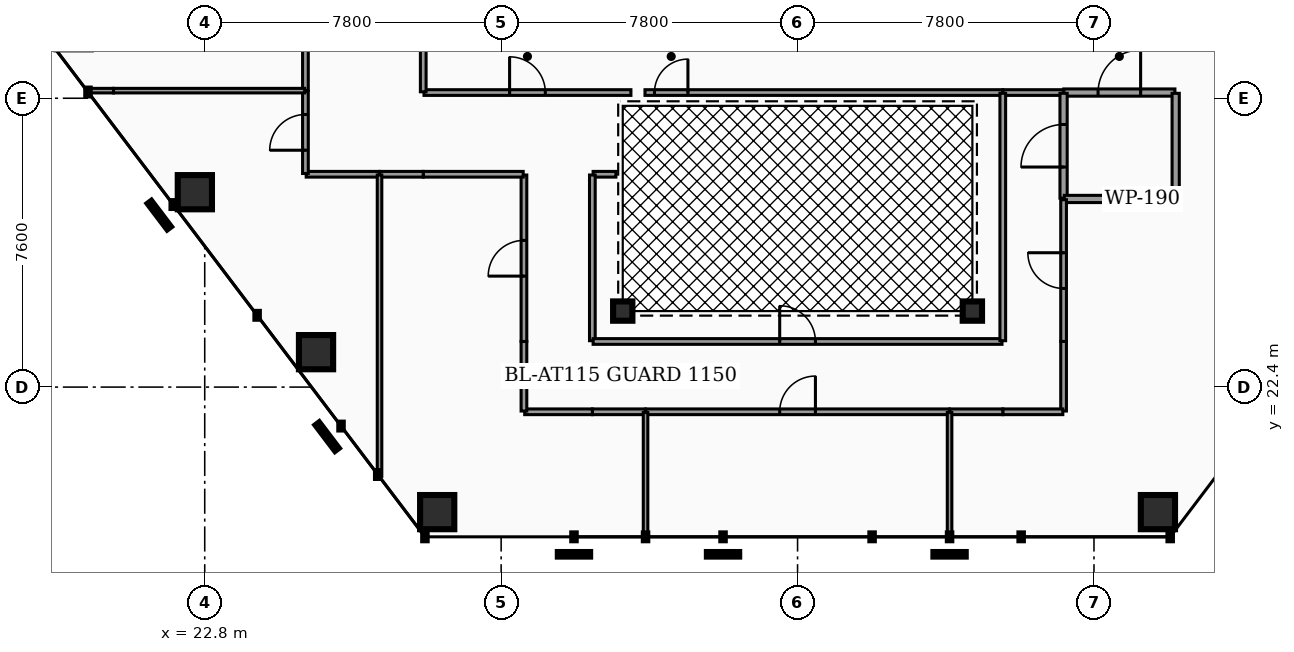
"""IFC4 building model, lengths in metres.
Left out: names, types, materials, properties, quantities, classifications, styles, units other than length and angle.
Written with IfcOpenShell. Run it as: python <this file> out.ifc"""

import sys

from ifc_helpers import new_model, si_unit, direction, frame, frame_2d, origin, origin_2d, place, context, subcontext, project, spatial, rectangle, hollow_rectangle, hollow_circle, extrude, element, fill, save


model = new_model("IFC4")
c1 = context("Model", 3, precision=1e-05, world=origin(), true_north=direction((0.0, 1.0)))
c2 = subcontext(c1, "Body", "Model", "MODEL_VIEW")
j1 = project(units=[si_unit("LENGTHUNIT", "METRE"), si_unit("PLANEANGLEUNIT", "RADIAN")], contexts=[c1])
p1 = place(None, origin())
s1 = spatial("IfcSite", under=j1, at=p1, CompositionType="ELEMENT")
p2 = place(p1, origin())
s2 = spatial("IfcBuilding", under=s1, at=p2, CompositionType="ELEMENT")
p3 = place(p2, frame((0.0, 0.0, 92.82)))
s3 = spatial("IfcBuildingStorey", under=s2, at=p3, CompositionType="ELEMENT", Elevation=92.82)
p4 = place(p3, frame((22.54, 27.528, 0.0), z_axis=(0.028788707178, 0.041299985686, 0.998731956794), x_axis=(-0.820362117185, 0.571844381531, 0.0)))
e1 = element("IfcColumn", 1, at=p4, inside=s3, PredefinedType="COLUMN", context=c2, shape_type="SweptSolid", body=[
    extrude(hollow_rectangle(XDim=0.9, YDim=0.9, WallThickness=0.045, at=origin_2d()), origin(), (0.0, 0.0, 1.0), 3.825),
])
p5 = place(p3, frame((25.729, 23.319, 0.0), z_axis=(0.057681862964, 0.003126561156, 0.9983301194), x_axis=(-0.054124089208, 0.998534217224, 0.0)))
e2 = element("IfcColumn", 2, at=p5, inside=s3, PredefinedType="COLUMN", context=c2, shape_type="SweptSolid", body=[
    extrude(hollow_rectangle(XDim=0.9, YDim=0.9, WallThickness=0.045, at=origin_2d()), origin(), (0.0, 0.0, 1.0), 3.826),
])
p6 = place(p3, frame((28.917, 19.11, 0.0), z_axis=(0.086417078511, -0.035063188704, 0.995641833864), x_axis=(0.375974351088, 0.926630070376, 0.0)))
e3 = element("IfcColumn", 3, at=p6, inside=s3, PredefinedType="COLUMN", context=c2, shape_type="SweptSolid", body=[
    extrude(hollow_rectangle(XDim=0.9, YDim=0.9, WallThickness=0.045, at=origin_2d()), origin(), (0.0, 0.0, 1.0), 3.836),
])
p7 = place(p3, frame((47.883, 19.11, 0.0), z_axis=(-0.086480238317, -0.035062995815, 0.995636356661), x_axis=(0.375736765938, -0.926726433594, 0.0)))
e4 = element("IfcColumn", 4, at=p7, inside=s3, PredefinedType="COLUMN", context=c2, shape_type="SweptSolid", body=[
    extrude(hollow_rectangle(XDim=0.9, YDim=0.9, WallThickness=0.045, at=origin_2d()), origin(), (0.0, 0.0, 1.0), 3.837),
])
for number, where, z_axis, x_axis in (
    (5, (33.8, 24.4, 0.0), (0.0, 0.0, 1.0), (1.0, 0.0, 0.0)),
    (6, (43.0, 24.4, 0.0), (0.0, 0.0, 1.0), (1.0, 0.0, 0.0)),
):
    element("IfcColumn", number, at=place(p3, frame(where, z_axis=z_axis, x_axis=x_axis)), inside=s3, PredefinedType="COLUMN", context=c2, shape_type="SweptSolid", body=[
        extrude(hollow_circle(Radius=0.254, WallThickness=0.02, at=origin_2d()), origin(), (0.0, 0.0, 1.0), 3.82),
    ])
p8 = place(p3, frame((45.405, 30.15, 0.0), z_axis=(0.0, 0.0, 1.0), x_axis=(1.0, 0.0, 0.0)))
e7 = element("IfcWall", 7, at=p8, inside=s3, PredefinedType="PARTITIONING", context=c2, shape_type="SweptSolid", body=[
    extrude(rectangle(XDim=2.925, YDim=0.19, at=frame_2d((1.462, 0.0))), origin(), (0.0, 0.0, 1.0), 2.777),
])
p9 = place(p8, frame((0.903, 0.0, 0.0)))
e8 = element("IfcOpeningElement", 8, at=p9, cuts=e7, PredefinedType="OPENING", context=c2, shape_type="SweptSolid", body=[
    extrude(rectangle(XDim=1.12, YDim=2.05, at=frame_2d((0.56, 1.025))), frame((0.0, 0.105, 0.0), z_axis=(0.0, -1.0, 0.0), x_axis=(1.0, 0.0, 0.0)), (0.0, 0.0, 1.0), 0.21),
])
p10 = place(p3, frame((43.805, 30.15, 0.0), z_axis=(0.0, 0.0, 1.0), x_axis=(1.0, 0.0, 0.0)))
e9 = element("IfcWall", 9, at=p10, inside=s3, PredefinedType="PARTITIONING", context=c2, shape_type="SweptSolid", body=[
    extrude(rectangle(XDim=1.59, YDim=0.15, at=frame_2d((0.795, 0.0))), origin(), (0.0, 0.0, 1.0), 2.777),
])
p11 = place(p3, frame((28.57, 30.15, 0.0), z_axis=(0.0, 0.0, 1.0), x_axis=(1.0, 0.0, 0.0)))
e10 = element("IfcWall", 10, at=p11, inside=s3, PredefinedType="PARTITIONING", context=c2, shape_type="SweptSolid", body=[
    extrude(rectangle(XDim=5.445, YDim=0.15, at=frame_2d((2.722, 0.0))), origin(), (0.0, 0.0, 1.0), 2.777),
])
p12 = place(p11, frame((2.252, 0.0, 0.0)))
e11 = element("IfcOpeningElement", 11, at=p12, cuts=e10, PredefinedType="OPENING", context=c2, shape_type="SweptSolid", body=[
    extrude(rectangle(XDim=0.94, YDim=2.05, at=frame_2d((0.47, 1.025))), frame((0.0, 0.085, 0.0), z_axis=(0.0, -1.0, 0.0), x_axis=(1.0, 0.0, 0.0)), (0.0, 0.0, 1.0), 0.17),
])
p13 = place(p3, frame((28.55, 30.17, 0.0), z_axis=(0.0, 0.0, 1.0), x_axis=(0.0, 1.0, 0.0)))
e12 = element("IfcWall", 12, at=p13, inside=s3, PredefinedType="PARTITIONING", context=c2, shape_type="SweptSolid", body=[
    extrude(rectangle(XDim=3.065, YDim=0.15, at=frame_2d((1.533, 0.0))), origin(), (0.0, 0.0, 1.0), 2.777),
])
p14 = place(p3, frame((34.385, 30.15, 0.0), z_axis=(0.0, 0.0, 1.0), x_axis=(1.0, 0.0, 0.0)))
e13 = element("IfcWall", 13, at=p14, inside=s3, PredefinedType="PARTITIONING", context=c2, shape_type="SweptSolid", body=[
    extrude(rectangle(XDim=9.41, YDim=0.15, at=frame_2d((4.705, 0.0))), origin(), (0.0, 0.0, 1.0), 2.777),
])
p15 = place(p14, frame((0.25, 0.0, 0.0)))
e14 = element("IfcOpeningElement", 14, at=p15, cuts=e13, PredefinedType="OPENING", context=c2, shape_type="SweptSolid", body=[
    extrude(rectangle(XDim=0.88, YDim=2.05, at=frame_2d((0.44, 1.025))), frame((0.0, 0.085, 0.0), z_axis=(0.0, -1.0, 0.0), x_axis=(1.0, 0.0, 0.0)), (0.0, 0.0, 1.0), 0.17),
])
p16 = place(p3, frame((45.4, 27.37, 0.0), z_axis=(0.0, 0.0, 1.0), x_axis=(0.0, 1.0, 0.0)))
e15 = element("IfcWall", 15, at=p16, inside=s3, PredefinedType="PARTITIONING", context=c2, shape_type="SweptSolid", body=[
    extrude(rectangle(XDim=2.76, YDim=0.19, at=frame_2d((1.38, 0.0))), origin(), (0.0, 0.0, 1.0), 2.777),
])
p17 = place(p16, frame((0.82, 0.0, 0.0)))
e16 = element("IfcOpeningElement", 16, at=p17, cuts=e15, PredefinedType="OPENING", context=c2, shape_type="SweptSolid", body=[
    extrude(rectangle(XDim=1.12, YDim=2.05, at=frame_2d((0.56, 1.025))), frame((0.0, 0.105, 0.0), z_axis=(0.0, -1.0, 0.0), x_axis=(1.0, 0.0, 0.0)), (0.0, 0.0, 1.0), 0.21),
])
p18 = place(p3, frame((45.42, 27.35, 0.0), z_axis=(0.0, 0.0, 1.0), x_axis=(1.0, 0.0, 0.0)))
e17 = element("IfcWall", 17, at=p18, inside=s3, PredefinedType="PARTITIONING", context=c2, shape_type="SweptSolid", body=[
    extrude(rectangle(XDim=2.91, YDim=0.19, at=frame_2d((1.455, 0.0))), origin(), (0.0, 0.0, 1.0), 2.777),
])
p19 = place(p3, frame((48.35, 27.37, 0.0), z_axis=(0.0, 0.0, 1.0), x_axis=(0.0, 1.0, 0.0)))
e18 = element("IfcWall", 18, at=p19, inside=s3, PredefinedType="PARTITIONING", context=c2, shape_type="SweptSolid", body=[
    extrude(rectangle(XDim=2.76, YDim=0.19, at=frame_2d((1.38, 0.0))), origin(), (0.0, 0.0, 1.0), 2.777),
])
p20 = place(p3, frame((34.405, 21.75, 0.0), z_axis=(0.0, 0.0, 1.0), x_axis=(1.0, 0.0, 0.0)))
e19 = element("IfcWall", 19, at=p20, inside=s3, PredefinedType="PARTITIONING", context=c2, shape_type="SweptSolid", body=[
    extrude(rectangle(XDim=7.99, YDim=0.15, at=frame_2d((3.995, 0.0))), origin(), (0.0, 0.0, 1.0), 2.777),
])
p21 = place(p20, frame((3.525, 0.0, 0.0)))
e20 = element("IfcOpeningElement", 20, at=p21, cuts=e19, PredefinedType="OPENING", context=c2, shape_type="SweptSolid", body=[
    extrude(rectangle(XDim=0.94, YDim=2.05, at=frame_2d((0.47, 1.025))), frame((0.0, 0.085, 0.0), z_axis=(0.0, -1.0, 0.0), x_axis=(1.0, 0.0, 0.0)), (0.0, 0.0, 1.0), 0.17),
])
p22 = place(p3, frame((33.0, 21.75, 0.0), z_axis=(0.0, 0.0, 1.0), x_axis=(1.0, 0.0, 0.0)))
e21 = element("IfcWall", 21, at=p22, inside=s3, PredefinedType="PARTITIONING", context=c2, shape_type="SweptSolid", body=[
    extrude(rectangle(XDim=1.395, YDim=0.15, at=frame_2d((0.698, 0.0))), origin(), (0.0, 0.0, 1.0), 2.777),
])
p23 = place(p3, frame((31.22, 21.75, 0.0), z_axis=(0.0, 0.0, 1.0), x_axis=(1.0, 0.0, 0.0)))
e22 = element("IfcWall", 22, at=p23, inside=s3, PredefinedType="PARTITIONING", context=c2, shape_type="SweptSolid", body=[
    extrude(rectangle(XDim=1.78, YDim=0.15, at=frame_2d((0.89, 0.0))), origin(), (0.0, 0.0, 1.0), 2.777),
])
p24 = place(p3, frame((31.2, 21.77, 0.0), z_axis=(0.0, 0.0, 1.0), x_axis=(0.0, 1.0, 0.0)))
e23 = element("IfcWall", 23, at=p24, inside=s3, PredefinedType="PARTITIONING", context=c2, shape_type="SweptSolid", body=[
    extrude(rectangle(XDim=1.83, YDim=0.15, at=frame_2d((0.915, 0.0))), origin(), (0.0, 0.0, 1.0), 2.777),
])
p25 = place(p3, frame((31.2, 23.6, 0.0), z_axis=(0.0, 0.0, 1.0), x_axis=(0.0, 1.0, 0.0)))
e24 = element("IfcWall", 24, at=p25, inside=s3, PredefinedType="PARTITIONING", context=c2, shape_type="SweptSolid", body=[
    extrude(rectangle(XDim=4.38, YDim=0.15, at=frame_2d((2.19, 0.0))), origin(), (0.0, 0.0, 1.0), 2.777),
])
p26 = place(p25, frame((1.72, 0.0, 0.0)))
e25 = element("IfcOpeningElement", 25, at=p26, cuts=e24, PredefinedType="OPENING", context=c2, shape_type="SweptSolid", body=[
    extrude(rectangle(XDim=0.94, YDim=2.05, at=frame_2d((0.47, 1.025))), frame((0.0, 0.085, 0.0), z_axis=(0.0, -1.0, 0.0), x_axis=(1.0, 0.0, 0.0)), (0.0, 0.0, 1.0), 0.17),
])
p27 = place(p3, frame((28.55, 28.0, 0.0), z_axis=(0.0, 0.0, 1.0), x_axis=(1.0, 0.0, 0.0)))
e26 = element("IfcWall", 26, at=p27, inside=s3, PredefinedType="PARTITIONING", context=c2, shape_type="SweptSolid", body=[
    extrude(rectangle(XDim=2.63, YDim=0.15, at=frame_2d((1.315, 0.0))), origin(), (0.0, 0.0, 1.0), 2.777),
])
p28 = place(p3, frame((27.405, 28.0, 0.0), z_axis=(0.0, 0.0, 1.0), x_axis=(1.0, 0.0, 0.0)))
e27 = element("IfcWall", 27, at=p28, inside=s3, PredefinedType="PARTITIONING", context=c2, shape_type="SweptSolid", body=[
    extrude(rectangle(XDim=1.145, YDim=0.15, at=frame_2d((0.573, 0.0))), origin(), (0.0, 0.0, 1.0), 2.777),
])
p29 = place(p3, frame((45.4, 23.6, 0.0), z_axis=(0.0, 0.0, 1.0), x_axis=(0.0, 1.0, 0.0)))
e28 = element("IfcWall", 28, at=p29, inside=s3, PredefinedType="PARTITIONING", context=c2, shape_type="SweptSolid", body=[
    extrude(rectangle(XDim=3.73, YDim=0.15, at=frame_2d((1.865, 0.0))), origin(), (0.0, 0.0, 1.0), 2.777),
])
p30 = place(p29, frame((1.395, 0.0, 0.0)))
e29 = element("IfcOpeningElement", 29, at=p30, cuts=e28, PredefinedType="OPENING", context=c2, shape_type="SweptSolid", body=[
    extrude(rectangle(XDim=0.94, YDim=2.05, at=frame_2d((0.47, 1.025))), frame((0.0, 0.085, 0.0), z_axis=(0.0, -1.0, 0.0), x_axis=(1.0, 0.0, 0.0)), (0.0, 0.0, 1.0), 0.17),
])
p31 = place(p3, frame((45.4, 21.77, 0.0), z_axis=(0.0, 0.0, 1.0), x_axis=(0.0, 1.0, 0.0)))
e30 = element("IfcWall", 30, at=p31, inside=s3, PredefinedType="PARTITIONING", context=c2, shape_type="SweptSolid", body=[
    extrude(rectangle(XDim=1.83, YDim=0.15, at=frame_2d((0.915, 0.0))), origin(), (0.0, 0.0, 1.0), 2.777),
])
p32 = place(p3, frame((43.8, 21.75, 0.0), z_axis=(0.0, 0.0, 1.0), x_axis=(1.0, 0.0, 0.0)))
e31 = element("IfcWall", 31, at=p32, inside=s3, PredefinedType="PARTITIONING", context=c2, shape_type="SweptSolid", body=[
    extrude(rectangle(XDim=1.58, YDim=0.15, at=frame_2d((0.79, 0.0))), origin(), (0.0, 0.0, 1.0), 2.777),
])
p33 = place(p3, frame((42.405, 21.75, 0.0), z_axis=(0.0, 0.0, 1.0), x_axis=(1.0, 0.0, 0.0)))
e32 = element("IfcWall", 32, at=p33, inside=s3, PredefinedType="PARTITIONING", context=c2, shape_type="SweptSolid", body=[
    extrude(rectangle(XDim=1.395, YDim=0.15, at=frame_2d((0.698, 0.0))), origin(), (0.0, 0.0, 1.0), 2.777),
])
p34 = place(p3, frame((25.47, 28.0, 0.0), z_axis=(0.0, 0.0, 1.0), x_axis=(1.0, 0.0, 0.0)))
e33 = element("IfcWall", 33, at=p34, inside=s3, PredefinedType="PARTITIONING", context=c2, shape_type="SweptSolid", body=[
    extrude(rectangle(XDim=1.925, YDim=0.15, at=frame_2d((0.962, 0.0))), origin(), (0.0, 0.0, 1.0), 2.777),
])
p35 = place(p3, frame((25.45, 28.02, 0.0), z_axis=(0.0, 0.0, 1.0), x_axis=(0.0, 1.0, 0.0)))
e34 = element("IfcWall", 34, at=p35, inside=s3, PredefinedType="PARTITIONING", context=c2, shape_type="SweptSolid", body=[
    extrude(rectangle(XDim=2.165, YDim=0.15, at=frame_2d((1.083, 0.0))), origin(), (0.0, 0.0, 1.0), 2.777),
])
p36 = place(p35, frame((0.613, 0.0, 0.0)))
e35 = element("IfcOpeningElement", 35, at=p36, cuts=e34, PredefinedType="OPENING", context=c2, shape_type="SweptSolid", body=[
    extrude(rectangle(XDim=0.94, YDim=2.05, at=frame_2d((0.47, 1.025))), frame((0.0, 0.085, 0.0), z_axis=(0.0, -1.0, 0.0), x_axis=(1.0, 0.0, 0.0)), (0.0, 0.0, 1.0), 0.17),
])
p37 = place(p3, frame((25.45, 30.205, 0.0), z_axis=(0.0, 0.0, 1.0), x_axis=(0.0, 1.0, 0.0)))
e36 = element("IfcWall", 36, at=p37, inside=s3, PredefinedType="PARTITIONING", context=c2, shape_type="SweptSolid", body=[
    extrude(rectangle(XDim=3.08, YDim=0.15, at=frame_2d((1.54, 0.0))), origin(), (0.0, 0.0, 1.0), 2.777),
])
p38 = place(p37, frame((1.07, 0.0, 0.0)))
e37 = element("IfcOpeningElement", 37, at=p38, cuts=e36, PredefinedType="OPENING", context=c2, shape_type="SweptSolid", body=[
    extrude(rectangle(XDim=0.94, YDim=2.05, at=frame_2d((0.47, 1.025))), frame((0.0, 0.085, 0.0), z_axis=(0.0, -1.0, 0.0), x_axis=(1.0, 0.0, 0.0)), (0.0, 0.0, 1.0), 0.17),
])
p39 = place(p3, frame((33.02, 28.0, 0.0), z_axis=(0.0, 0.0, 1.0), x_axis=(1.0, 0.0, 0.0)))
e38 = element("IfcWall", 38, at=p39, inside=s3, PredefinedType="PARTITIONING", context=c2, shape_type="SweptSolid", body=[
    extrude(rectangle(XDim=0.6, YDim=0.15, at=frame_2d((0.3, 0.0))), origin(), (0.0, 0.0, 1.0), 2.777),
])
p40 = place(p3, frame((33.0, 23.62, 0.0), z_axis=(0.0, 0.0, 1.0), x_axis=(0.0, 1.0, 0.0)))
e39 = element("IfcWall", 39, at=p40, inside=s3, PredefinedType="PARTITIONING", context=c2, shape_type="SweptSolid", body=[
    extrude(rectangle(XDim=4.36, YDim=0.15, at=frame_2d((2.18, 0.0))), origin(), (0.0, 0.0, 1.0), 2.777),
])
p41 = place(p3, frame((33.02, 23.6, 0.0), z_axis=(0.0, 0.0, 1.0), x_axis=(1.0, 0.0, 0.0)))
e40 = element("IfcWall", 40, at=p41, inside=s3, PredefinedType="PARTITIONING", context=c2, shape_type="SweptSolid", body=[
    extrude(rectangle(XDim=10.76, YDim=0.15, at=frame_2d((5.38, 0.0))), origin(), (0.0, 0.0, 1.0), 2.777),
])
p42 = place(p41, frame((4.91, 0.0, 0.0)))
e41 = element("IfcOpeningElement", 41, at=p42, cuts=e40, PredefinedType="OPENING", context=c2, shape_type="SweptSolid", body=[
    extrude(rectangle(XDim=0.94, YDim=2.05, at=frame_2d((0.47, 1.025))), frame((0.0, 0.085, 0.0), z_axis=(0.0, -1.0, 0.0), x_axis=(1.0, 0.0, 0.0)), (0.0, 0.0, 1.0), 0.17),
])
p43 = place(p3, frame((43.8, 23.62, 0.0), z_axis=(0.0, 0.0, 1.0), x_axis=(0.0, 1.0, 0.0)))
e42 = element("IfcWall", 42, at=p43, inside=s3, PredefinedType="PARTITIONING", context=c2, shape_type="SweptSolid", body=[
    extrude(rectangle(XDim=6.51, YDim=0.15, at=frame_2d((3.255, 0.0))), origin(), (0.0, 0.0, 1.0), 2.777),
])
for number, where, z_axis, x_axis in (
    (43, (34.4, 18.475, 0.0), (0.0, 0.0, 1.0), (0.0, 1.0, 0.0)),
    (44, (42.4, 18.475, 0.0), (0.0, 0.0, 1.0), (0.0, 1.0, 0.0)),
):
    element("IfcWall", number, at=place(p3, frame(where, z_axis=z_axis, x_axis=x_axis)), inside=s3, PredefinedType="PARTITIONING", context=c2, shape_type="SweptSolid", body=[
        extrude(rectangle(XDim=3.255, YDim=0.12, at=frame_2d((1.627, 0.0))), origin(), (0.0, 0.0, 1.0), 2.777),
    ])
p44 = place(p3, frame((27.4, 20.052, 0.0), z_axis=(0.0, 0.0, 1.0), x_axis=(0.0, 1.0, 0.0)))
e45 = element("IfcWall", 45, at=p44, inside=s3, PredefinedType="PARTITIONING", context=c2, shape_type="SweptSolid", body=[
    extrude(rectangle(XDim=7.928, YDim=0.12, at=frame_2d((3.964, 0.0))), origin(), (0.0, 0.0, 1.0), 2.777),
])
p45 = place(p3, frame((19.716, 30.2, 0.0), z_axis=(0.0, 0.0, 1.0), x_axis=(1.0, 0.0, 0.0)))
e46 = element("IfcWall", 46, at=p45, inside=s3, PredefinedType="PARTITIONING", context=c2, shape_type="SweptSolid", body=[
    extrude(rectangle(XDim=0.684, YDim=0.12, at=frame_2d((0.342, 0.0))), origin(), (0.0, 0.0, 1.0), 2.777),
])
p46 = place(p3, frame((20.4, 30.2, 0.0), z_axis=(0.0, 0.0, 1.0), x_axis=(1.0, 0.0, 0.0)))
e47 = element("IfcWall", 47, at=p46, inside=s3, PredefinedType="PARTITIONING", context=c2, shape_type="SweptSolid", body=[
    extrude(rectangle(XDim=5.03, YDim=0.12, at=frame_2d((2.515, 0.0))), origin(), (0.0, 0.0, 1.0), 2.777),
])
p47 = place(p9, origin())
e48 = element("IfcDoor", 48, at=p47, inside=s3, OperationType="SINGLE_SWING_RIGHT", PredefinedType="DOOR", context=c2, shape_type="SweptSolid", body=[
    extrude(rectangle(XDim=1.12, YDim=2.05, at=frame_2d((0.56, 1.025))), frame((0.0, 0.025, 0.0), z_axis=(0.0, -1.0, 0.0), x_axis=(1.0, 0.0, 0.0)), (0.0, 0.0, 1.0), 0.05),
])
fill(e8, e48)
p48 = place(p12, origin())
e49 = element("IfcDoor", 49, at=p48, inside=s3, OperationType="SINGLE_SWING_LEFT", PredefinedType="DOOR", context=c2, shape_type="SweptSolid", body=[
    extrude(rectangle(XDim=0.94, YDim=2.05, at=frame_2d((0.47, 1.025))), frame((0.0, 0.025, 0.0), z_axis=(0.0, -1.0, 0.0), x_axis=(1.0, 0.0, 0.0)), (0.0, 0.0, 1.0), 0.05),
])
fill(e11, e49)
p49 = place(p15, origin())
e50 = element("IfcDoor", 50, at=p49, inside=s3, OperationType="SINGLE_SWING_RIGHT", PredefinedType="DOOR", context=c2, shape_type="SweptSolid", body=[
    extrude(rectangle(XDim=0.88, YDim=2.05, at=frame_2d((0.44, 1.025))), frame((0.0, 0.025, 0.0), z_axis=(0.0, -1.0, 0.0), x_axis=(1.0, 0.0, 0.0)), (0.0, 0.0, 1.0), 0.05),
])
fill(e14, e50)
p50 = place(p17, origin())
e51 = element("IfcDoor", 51, at=p50, inside=s3, OperationType="SINGLE_SWING_LEFT", PredefinedType="DOOR", context=c2, shape_type="SweptSolid", body=[
    extrude(rectangle(XDim=1.12, YDim=2.05, at=frame_2d((0.56, 1.025))), frame((0.0, 0.025, 0.0), z_axis=(0.0, -1.0, 0.0), x_axis=(1.0, 0.0, 0.0)), (0.0, 0.0, 1.0), 0.05),
])
fill(e16, e51)
p51 = place(p21, origin())
e52 = element("IfcDoor", 52, at=p51, inside=s3, OperationType="SINGLE_SWING_RIGHT", PredefinedType="DOOR", context=c2, shape_type="SweptSolid", body=[
    extrude(rectangle(XDim=0.94, YDim=2.05, at=frame_2d((0.47, 1.025))), frame((0.0, 0.025, 0.0), z_axis=(0.0, -1.0, 0.0), x_axis=(1.0, 0.0, 0.0)), (0.0, 0.0, 1.0), 0.05),
])
fill(e20, e52)
p52 = place(p26, origin())
e53 = element("IfcDoor", 53, at=p52, inside=s3, OperationType="SINGLE_SWING_LEFT", PredefinedType="DOOR", context=c2, shape_type="SweptSolid", body=[
    extrude(rectangle(XDim=0.94, YDim=2.05, at=frame_2d((0.47, 1.025))), frame((0.0, 0.025, 0.0), z_axis=(0.0, -1.0, 0.0), x_axis=(1.0, 0.0, 0.0)), (0.0, 0.0, 1.0), 0.05),
])
fill(e25, e53)
p53 = place(p30, origin())
e54 = element("IfcDoor", 54, at=p53, inside=s3, OperationType="SINGLE_SWING_RIGHT", PredefinedType="DOOR", context=c2, shape_type="SweptSolid", body=[
    extrude(rectangle(XDim=0.94, YDim=2.05, at=frame_2d((0.47, 1.025))), frame((0.0, 0.025, 0.0), z_axis=(0.0, -1.0, 0.0), x_axis=(1.0, 0.0, 0.0)), (0.0, 0.0, 1.0), 0.05),
])
fill(e29, e54)
p54 = place(p36, origin())
e55 = element("IfcDoor", 55, at=p54, inside=s3, OperationType="SINGLE_SWING_LEFT", PredefinedType="DOOR", context=c2, shape_type="SweptSolid", body=[
    extrude(rectangle(XDim=0.94, YDim=2.05, at=frame_2d((0.47, 1.025))), frame((0.0, 0.025, 0.0), z_axis=(0.0, -1.0, 0.0), x_axis=(1.0, 0.0, 0.0)), (0.0, 0.0, 1.0), 0.05),
])
fill(e35, e55)
p55 = place(p42, origin())
e56 = element("IfcDoor", 56, at=p55, inside=s3, OperationType="SINGLE_SWING_LEFT", PredefinedType="DOOR", context=c2, shape_type="SweptSolid", body=[
    extrude(rectangle(XDim=0.94, YDim=2.05, at=frame_2d((0.47, 1.025))), frame((0.0, 0.025, 0.0), z_axis=(0.0, -1.0, 0.0), x_axis=(1.0, 0.0, 0.0)), (0.0, 0.0, 1.0), 0.05),
])
fill(e41, e56)
save(model, sys.argv[1])
